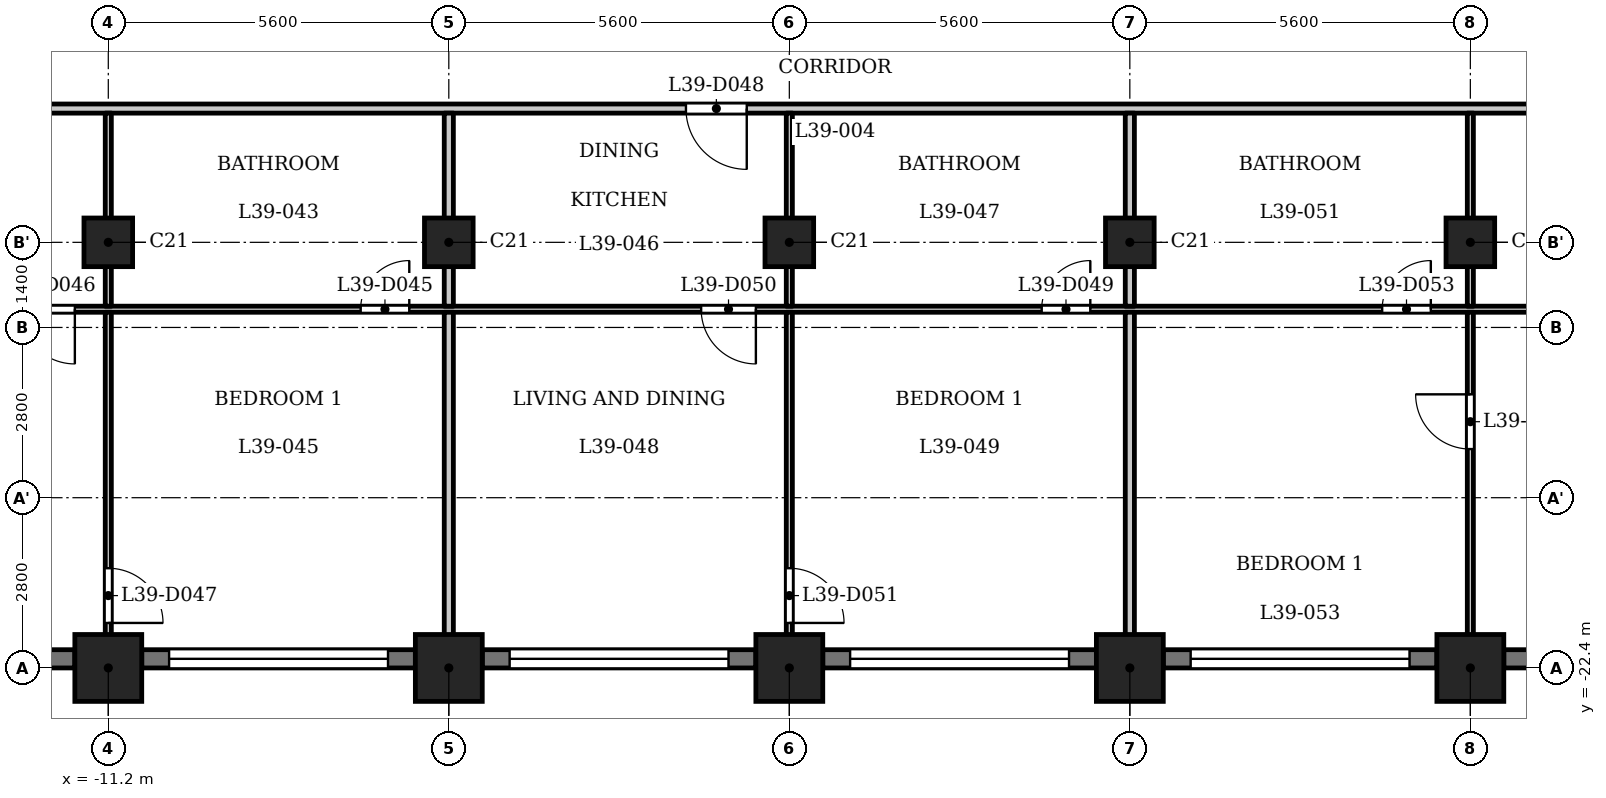
"""IFC4 building model, lengths in metres.
Left out: names, types, materials, properties, quantities, classifications, styles, units other than length and angle.
Written with IfcOpenShell. Run it as: python <this file> out.ifc"""

import sys

from ifc_helpers import new_model, si_unit, direction, frame, frame_2d, origin, origin_2d, place, context, subcontext, project, spatial, rectangle, extrude, element, fill, save


model = new_model("IFC4")
c1 = context("Model", 3, precision=1e-05, world=origin(), true_north=direction((0.0, 1.0)))
c2 = subcontext(c1, "Body", "Model", "MODEL_VIEW")
j1 = project(units=[si_unit("LENGTHUNIT", "METRE"), si_unit("PLANEANGLEUNIT", "RADIAN")], contexts=[c1])
p1 = place(None, origin())
s1 = spatial("IfcSite", under=j1, at=p1, CompositionType="ELEMENT")
p2 = place(p1, origin())
s2 = spatial("IfcBuilding", under=s1, at=p2, CompositionType="ELEMENT")
p3 = place(p2, frame((0.0, 0.0, 153.6)))
s3 = spatial("IfcBuildingStorey", under=s2, at=p3, CompositionType="ELEMENT", Elevation=153.6)
for number, where, z_axis, x_axis in (
    (1, (-11.2, -22.4, 0.0), (0.0, 0.0, 1.0), (1.0, 0.0, 0.0)),
    (2, (-5.6, -22.4, 0.0), (0.0, 0.0, 1.0), (1.0, 0.0, 0.0)),
    (3, (0.0, -22.4, 0.0), (0.0, 0.0, 1.0), (1.0, 0.0, 0.0)),
    (4, (5.6, -22.4, 0.0), (0.0, 0.0, 1.0), (1.0, 0.0, 0.0)),
    (5, (11.2, -22.4, 0.0), (0.0, 0.0, 1.0), (1.0, 0.0, 0.0)),
):
    element("IfcColumn", number, at=place(p3, frame(where, z_axis=z_axis, x_axis=x_axis)), inside=s3, PredefinedType="COLUMN", context=c2, shape_type="SweptSolid", body=[
        extrude(rectangle(XDim=1.1, YDim=1.1, at=origin_2d()), origin(), (0.0, 0.0, 1.0), 3.5),
    ])
for number, where, z_axis, x_axis in (
    (6, (-11.2, -15.4, 0.0), (0.0, 0.0, 1.0), (1.0, 0.0, 0.0)),
    (7, (-5.6, -15.4, 0.0), (0.0, 0.0, 1.0), (1.0, 0.0, 0.0)),
    (8, (0.0, -15.4, 0.0), (0.0, 0.0, 1.0), (1.0, 0.0, 0.0)),
    (9, (5.6, -15.4, 0.0), (0.0, 0.0, 1.0), (1.0, 0.0, 0.0)),
    (10, (11.2, -15.4, 0.0), (0.0, 0.0, 1.0), (1.0, 0.0, 0.0)),
):
    element("IfcColumn", number, at=place(p3, frame(where, z_axis=z_axis, x_axis=x_axis)), inside=s3, PredefinedType="COLUMN", context=c2, shape_type="SweptSolid", body=[
        extrude(rectangle(XDim=0.8, YDim=0.8, at=origin_2d()), origin(), (0.0, 0.0, 1.0), 3.5),
    ])
p4 = place(p3, frame((-16.25, -22.25, 0.0), z_axis=(0.0, 0.0, 1.0), x_axis=(1.0, 0.0, 0.0)))
e11 = element("IfcWall", 11, at=p4, inside=s3, PredefinedType="SOLIDWALL", context=c2, shape_type="SweptSolid", body=[
    extrude(rectangle(XDim=4.5, YDim=0.3, at=frame_2d((2.25, 0.0))), origin(), (0.0, 0.0, 1.0), 2.45),
])
p5 = place(p4, frame((0.45, 0.0, 1.2)))
e12 = element("IfcOpeningElement", 12, at=p5, cuts=e11, PredefinedType="OPENING", context=c2, shape_type="SweptSolid", body=[
    extrude(rectangle(XDim=3.6, YDim=0.95, at=frame_2d((1.8, 0.475))), frame((0.0, 0.16, 0.0), z_axis=(0.0, -1.0, 0.0), x_axis=(1.0, 0.0, 0.0)), (0.0, 0.0, 1.0), 0.32),
])
p6 = place(p3, frame((-10.65, -22.25, 0.0), z_axis=(0.0, 0.0, 1.0), x_axis=(1.0, 0.0, 0.0)))
e13 = element("IfcWall", 13, at=p6, inside=s3, PredefinedType="SOLIDWALL", context=c2, shape_type="SweptSolid", body=[
    extrude(rectangle(XDim=4.5, YDim=0.3, at=frame_2d((2.25, 0.0))), origin(), (0.0, 0.0, 1.0), 2.45),
])
p7 = place(p6, frame((0.45, 0.0, 1.2)))
e14 = element("IfcOpeningElement", 14, at=p7, cuts=e13, PredefinedType="OPENING", context=c2, shape_type="SweptSolid", body=[
    extrude(rectangle(XDim=3.6, YDim=0.95, at=frame_2d((1.8, 0.475))), frame((0.0, 0.16, 0.0), z_axis=(0.0, -1.0, 0.0), x_axis=(1.0, 0.0, 0.0)), (0.0, 0.0, 1.0), 0.32),
])
p8 = place(p3, frame((-5.05, -22.25, 0.0), z_axis=(0.0, 0.0, 1.0), x_axis=(1.0, 0.0, 0.0)))
e15 = element("IfcWall", 15, at=p8, inside=s3, PredefinedType="SOLIDWALL", context=c2, shape_type="SweptSolid", body=[
    extrude(rectangle(XDim=4.5, YDim=0.3, at=frame_2d((2.25, 0.0))), origin(), (0.0, 0.0, 1.0), 2.45),
])
p9 = place(p8, frame((0.45, 0.0, 1.2)))
e16 = element("IfcOpeningElement", 16, at=p9, cuts=e15, PredefinedType="OPENING", context=c2, shape_type="SweptSolid", body=[
    extrude(rectangle(XDim=3.6, YDim=0.95, at=frame_2d((1.8, 0.475))), frame((0.0, 0.16, 0.0), z_axis=(0.0, -1.0, 0.0), x_axis=(1.0, 0.0, 0.0)), (0.0, 0.0, 1.0), 0.32),
])
p10 = place(p3, frame((0.55, -22.25, 0.0), z_axis=(0.0, 0.0, 1.0), x_axis=(1.0, 0.0, 0.0)))
e17 = element("IfcWall", 17, at=p10, inside=s3, PredefinedType="SOLIDWALL", context=c2, shape_type="SweptSolid", body=[
    extrude(rectangle(XDim=4.5, YDim=0.3, at=frame_2d((2.25, 0.0))), origin(), (0.0, 0.0, 1.0), 2.45),
])
p11 = place(p10, frame((0.45, 0.0, 1.2)))
e18 = element("IfcOpeningElement", 18, at=p11, cuts=e17, PredefinedType="OPENING", context=c2, shape_type="SweptSolid", body=[
    extrude(rectangle(XDim=3.6, YDim=0.95, at=frame_2d((1.8, 0.475))), frame((0.0, 0.16, 0.0), z_axis=(0.0, -1.0, 0.0), x_axis=(1.0, 0.0, 0.0)), (0.0, 0.0, 1.0), 0.32),
])
p12 = place(p3, frame((6.15, -22.25, 0.0), z_axis=(0.0, 0.0, 1.0), x_axis=(1.0, 0.0, 0.0)))
e19 = element("IfcWall", 19, at=p12, inside=s3, PredefinedType="SOLIDWALL", context=c2, shape_type="SweptSolid", body=[
    extrude(rectangle(XDim=4.5, YDim=0.3, at=frame_2d((2.25, 0.0))), origin(), (0.0, 0.0, 1.0), 2.45),
])
p13 = place(p12, frame((0.45, 0.0, 1.2)))
e20 = element("IfcOpeningElement", 20, at=p13, cuts=e19, PredefinedType="OPENING", context=c2, shape_type="SweptSolid", body=[
    extrude(rectangle(XDim=3.6, YDim=0.95, at=frame_2d((1.8, 0.475))), frame((0.0, 0.16, 0.0), z_axis=(0.0, -1.0, 0.0), x_axis=(1.0, 0.0, 0.0)), (0.0, 0.0, 1.0), 0.32),
])
p14 = place(p3, frame((11.75, -22.25, 0.0), z_axis=(0.0, 0.0, 1.0), x_axis=(1.0, 0.0, 0.0)))
e21 = element("IfcWall", 21, at=p14, inside=s3, PredefinedType="SOLIDWALL", context=c2, shape_type="SweptSolid", body=[
    extrude(rectangle(XDim=4.5, YDim=0.3, at=frame_2d((2.25, 0.0))), origin(), (0.0, 0.0, 1.0), 2.45),
])
p15 = place(p14, frame((0.45, 0.0, 1.2)))
e22 = element("IfcOpeningElement", 22, at=p15, cuts=e21, PredefinedType="OPENING", context=c2, shape_type="SweptSolid", body=[
    extrude(rectangle(XDim=3.6, YDim=0.95, at=frame_2d((1.8, 0.475))), frame((0.0, 0.16, 0.0), z_axis=(0.0, -1.0, 0.0), x_axis=(1.0, 0.0, 0.0)), (0.0, 0.0, 1.0), 0.32),
])
p16 = place(p3, frame((-16.725, -16.5, 0.0), z_axis=(0.0, 0.0, 1.0), x_axis=(1.0, 0.0, 0.0)))
e23 = element("IfcWall", 23, at=p16, inside=s3, PredefinedType="PARTITIONING", context=c2, shape_type="SweptSolid", body=[
    extrude(rectangle(XDim=33.45, YDim=0.1, at=frame_2d((16.725, 0.0))), origin(), (0.0, 0.0, 1.0), 3.2),
])
p17 = place(p16, frame((9.675, 0.0, 0.0)))
e24 = element("IfcOpeningElement", 24, at=p17, cuts=e23, PredefinedType="OPENING", context=c2, shape_type="SweptSolid", body=[
    extrude(rectangle(XDim=0.8, YDim=2.1, at=frame_2d((0.4, 1.05))), frame((0.0, 0.06, 0.0), z_axis=(0.0, -1.0, 0.0), x_axis=(1.0, 0.0, 0.0)), (0.0, 0.0, 1.0), 0.12),
])
p18 = place(p16, frame((4.075, 0.0, 0.0)))
e25 = element("IfcOpeningElement", 25, at=p18, cuts=e23, PredefinedType="OPENING", context=c2, shape_type="SweptSolid", body=[
    extrude(rectangle(XDim=0.9, YDim=2.1, at=frame_2d((0.45, 1.05))), frame((0.0, 0.06, 0.0), z_axis=(0.0, -1.0, 0.0), x_axis=(1.0, 0.0, 0.0)), (0.0, 0.0, 1.0), 0.12),
])
p19 = place(p16, frame((20.875, 0.0, 0.0)))
e26 = element("IfcOpeningElement", 26, at=p19, cuts=e23, PredefinedType="OPENING", context=c2, shape_type="SweptSolid", body=[
    extrude(rectangle(XDim=0.8, YDim=2.1, at=frame_2d((0.4, 1.05))), frame((0.0, 0.06, 0.0), z_axis=(0.0, -1.0, 0.0), x_axis=(1.0, 0.0, 0.0)), (0.0, 0.0, 1.0), 0.12),
])
p20 = place(p16, frame((15.275, 0.0, 0.0)))
e27 = element("IfcOpeningElement", 27, at=p20, cuts=e23, PredefinedType="OPENING", context=c2, shape_type="SweptSolid", body=[
    extrude(rectangle(XDim=0.9, YDim=2.1, at=frame_2d((0.45, 1.05))), frame((0.0, 0.06, 0.0), z_axis=(0.0, -1.0, 0.0), x_axis=(1.0, 0.0, 0.0)), (0.0, 0.0, 1.0), 0.12),
])
p21 = place(p16, frame((26.475, 0.0, 0.0)))
e28 = element("IfcOpeningElement", 28, at=p21, cuts=e23, PredefinedType="OPENING", context=c2, shape_type="SweptSolid", body=[
    extrude(rectangle(XDim=0.8, YDim=2.1, at=frame_2d((0.4, 1.05))), frame((0.0, 0.06, 0.0), z_axis=(0.0, -1.0, 0.0), x_axis=(1.0, 0.0, 0.0)), (0.0, 0.0, 1.0), 0.12),
])
p22 = place(p16, frame((30.575, 0.0, 0.0)))
e29 = element("IfcOpeningElement", 29, at=p22, cuts=e23, PredefinedType="OPENING", context=c2, shape_type="SweptSolid", body=[
    extrude(rectangle(XDim=0.9, YDim=2.1, at=frame_2d((0.45, 1.05))), frame((0.0, 0.06, 0.0), z_axis=(0.0, -1.0, 0.0), x_axis=(1.0, 0.0, 0.0)), (0.0, 0.0, 1.0), 0.12),
])
p23 = place(p3, frame((-17.4, -13.2, 0.0), z_axis=(0.0, 0.0, 1.0), x_axis=(1.0, 0.0, 0.0)))
e30 = element("IfcWall", 30, at=p23, inside=s3, PredefinedType="PARTITIONING", context=c2, shape_type="SweptSolid", body=[
    extrude(rectangle(XDim=34.8, YDim=0.15, at=frame_2d((17.4, 0.0))), origin(), (0.0, 0.0, 1.0), 3.2),
])
p24 = place(p23, frame((0.15, 0.0, 0.0)))
e31 = element("IfcOpeningElement", 31, at=p24, cuts=e30, PredefinedType="OPENING", context=c2, shape_type="SweptSolid", body=[
    extrude(rectangle(XDim=1.0, YDim=2.1, at=frame_2d((0.5, 1.05))), frame((0.0, 0.085, 0.0), z_axis=(0.0, -1.0, 0.0), x_axis=(1.0, 0.0, 0.0)), (0.0, 0.0, 1.0), 0.17),
])
p25 = place(p23, frame((33.55, 0.0, 0.0)))
e32 = element("IfcOpeningElement", 32, at=p25, cuts=e30, PredefinedType="OPENING", context=c2, shape_type="SweptSolid", body=[
    extrude(rectangle(XDim=1.0, YDim=2.1, at=frame_2d((0.5, 1.05))), frame((0.0, 0.085, 0.0), z_axis=(0.0, -1.0, 0.0), x_axis=(1.0, 0.0, 0.0)), (0.0, 0.0, 1.0), 0.17),
])
p26 = place(p23, frame((15.7, 0.0, 0.0)))
e33 = element("IfcOpeningElement", 33, at=p26, cuts=e30, PredefinedType="OPENING", context=c2, shape_type="SweptSolid", body=[
    extrude(rectangle(XDim=1.0, YDim=2.1, at=frame_2d((0.5, 1.05))), frame((0.0, 0.085, 0.0), z_axis=(0.0, -1.0, 0.0), x_axis=(1.0, 0.0, 0.0)), (0.0, 0.0, 1.0), 0.17),
])
p27 = place(p3, frame((-11.2, -22.93, 0.0), z_axis=(0.0, 0.0, 1.0), x_axis=(0.0, 1.0, 0.0)))
e34 = element("IfcWall", 34, at=p27, inside=s3, PredefinedType="PARTITIONING", context=c2, shape_type="SweptSolid", body=[
    extrude(rectangle(XDim=6.38, YDim=0.1, at=frame_2d((3.19, 0.0))), origin(), (0.0, 0.0, 1.0), 3.2),
])
p28 = place(p27, frame((1.27, 0.0, 0.0)))
e35 = element("IfcOpeningElement", 35, at=p28, cuts=e34, PredefinedType="OPENING", context=c2, shape_type="SweptSolid", body=[
    extrude(rectangle(XDim=0.9, YDim=2.1, at=frame_2d((0.45, 1.05))), frame((0.0, 0.06, 0.0), z_axis=(0.0, -1.0, 0.0), x_axis=(1.0, 0.0, 0.0)), (0.0, 0.0, 1.0), 0.12),
])
p29 = place(p3, frame((-11.2, -16.45, 0.0), z_axis=(0.0, 0.0, 1.0), x_axis=(0.0, 1.0, 0.0)))
e36 = element("IfcWall", 36, at=p29, inside=s3, PredefinedType="PARTITIONING", context=c2, shape_type="SweptSolid", body=[
    extrude(rectangle(XDim=3.175, YDim=0.1, at=frame_2d((1.587, 0.0))), origin(), (0.0, 0.0, 1.0), 3.2),
])
p30 = place(p3, frame((-5.6, -22.93, 0.0), z_axis=(0.0, 0.0, 1.0), x_axis=(0.0, 1.0, 0.0)))
e37 = element("IfcWall", 37, at=p30, inside=s3, PredefinedType="PARTITIONING", context=c2, shape_type="SweptSolid", body=[
    extrude(rectangle(XDim=6.38, YDim=0.15, at=frame_2d((3.19, 0.0))), origin(), (0.0, 0.0, 1.0), 3.2),
])
p31 = place(p3, frame((-5.6, -16.45, 0.0), z_axis=(0.0, 0.0, 1.0), x_axis=(0.0, 1.0, 0.0)))
e38 = element("IfcWall", 38, at=p31, inside=s3, PredefinedType="PARTITIONING", context=c2, shape_type="SweptSolid", body=[
    extrude(rectangle(XDim=3.175, YDim=0.15, at=frame_2d((1.587, 0.0))), origin(), (0.0, 0.0, 1.0), 3.2),
])
p32 = place(p3, frame((0.0, -22.93, 0.0), z_axis=(0.0, 0.0, 1.0), x_axis=(0.0, 1.0, 0.0)))
e39 = element("IfcWall", 39, at=p32, inside=s3, PredefinedType="PARTITIONING", context=c2, shape_type="SweptSolid", body=[
    extrude(rectangle(XDim=6.38, YDim=0.1, at=frame_2d((3.19, 0.0))), origin(), (0.0, 0.0, 1.0), 3.2),
])
p33 = place(p32, frame((1.27, 0.0, 0.0)))
e40 = element("IfcOpeningElement", 40, at=p33, cuts=e39, PredefinedType="OPENING", context=c2, shape_type="SweptSolid", body=[
    extrude(rectangle(XDim=0.9, YDim=2.1, at=frame_2d((0.45, 1.05))), frame((0.0, 0.06, 0.0), z_axis=(0.0, -1.0, 0.0), x_axis=(1.0, 0.0, 0.0)), (0.0, 0.0, 1.0), 0.12),
])
p34 = place(p3, frame((0.0, -16.45, 0.0), z_axis=(0.0, 0.0, 1.0), x_axis=(0.0, 1.0, 0.0)))
e41 = element("IfcWall", 41, at=p34, inside=s3, PredefinedType="PARTITIONING", context=c2, shape_type="SweptSolid", body=[
    extrude(rectangle(XDim=3.175, YDim=0.1, at=frame_2d((1.587, 0.0))), origin(), (0.0, 0.0, 1.0), 3.2),
])
p35 = place(p3, frame((5.6, -22.93, 0.0), z_axis=(0.0, 0.0, 1.0), x_axis=(0.0, 1.0, 0.0)))
e42 = element("IfcWall", 42, at=p35, inside=s3, PredefinedType="PARTITIONING", context=c2, shape_type="SweptSolid", body=[
    extrude(rectangle(XDim=6.38, YDim=0.15, at=frame_2d((3.19, 0.0))), origin(), (0.0, 0.0, 1.0), 3.2),
])
p36 = place(p3, frame((5.6, -16.45, 0.0), z_axis=(0.0, 0.0, 1.0), x_axis=(0.0, 1.0, 0.0)))
e43 = element("IfcWall", 43, at=p36, inside=s3, PredefinedType="PARTITIONING", context=c2, shape_type="SweptSolid", body=[
    extrude(rectangle(XDim=3.175, YDim=0.15, at=frame_2d((1.587, 0.0))), origin(), (0.0, 0.0, 1.0), 3.2),
])
p37 = place(p3, frame((11.2, -22.93, 0.0), z_axis=(0.0, 0.0, 1.0), x_axis=(0.0, 1.0, 0.0)))
e44 = element("IfcWall", 44, at=p37, inside=s3, PredefinedType="PARTITIONING", context=c2, shape_type="SweptSolid", body=[
    extrude(rectangle(XDim=6.38, YDim=0.1, at=frame_2d((3.19, 0.0))), origin(), (0.0, 0.0, 1.0), 3.2),
])
p38 = place(p37, frame((4.13, 0.0, 0.0)))
e45 = element("IfcOpeningElement", 45, at=p38, cuts=e44, PredefinedType="OPENING", context=c2, shape_type="SweptSolid", body=[
    extrude(rectangle(XDim=0.9, YDim=2.1, at=frame_2d((0.45, 1.05))), frame((0.0, 0.06, 0.0), z_axis=(0.0, -1.0, 0.0), x_axis=(1.0, 0.0, 0.0)), (0.0, 0.0, 1.0), 0.12),
])
p39 = place(p3, frame((11.2, -16.45, 0.0), z_axis=(0.0, 0.0, 1.0), x_axis=(0.0, 1.0, 0.0)))
e46 = element("IfcWall", 46, at=p39, inside=s3, PredefinedType="PARTITIONING", context=c2, shape_type="SweptSolid", body=[
    extrude(rectangle(XDim=3.175, YDim=0.1, at=frame_2d((1.587, 0.0))), origin(), (0.0, 0.0, 1.0), 3.2),
])
p40 = place(p17, origin())
e47 = element("IfcDoor", 47, at=p40, inside=s3, OperationType="SINGLE_SWING_LEFT", PredefinedType="DOOR", context=c2, shape_type="SweptSolid", body=[
    extrude(rectangle(XDim=0.8, YDim=2.1, at=frame_2d((0.4, 1.05))), frame((0.0, 0.025, 0.0), z_axis=(0.0, -1.0, 0.0), x_axis=(1.0, 0.0, 0.0)), (0.0, 0.0, 1.0), 0.05),
])
fill(e24, e47)
p41 = place(p18, origin())
e48 = element("IfcDoor", 48, at=p41, inside=s3, OperationType="SINGLE_SWING_RIGHT", PredefinedType="DOOR", context=c2, shape_type="SweptSolid", body=[
    extrude(rectangle(XDim=0.9, YDim=2.1, at=frame_2d((0.45, 1.05))), frame((0.0, 0.025, 0.0), z_axis=(0.0, -1.0, 0.0), x_axis=(1.0, 0.0, 0.0)), (0.0, 0.0, 1.0), 0.05),
])
fill(e25, e48)
p42 = place(p28, origin())
e49 = element("IfcDoor", 49, at=p42, inside=s3, OperationType="SINGLE_SWING_LEFT", PredefinedType="DOOR", context=c2, shape_type="SweptSolid", body=[
    extrude(rectangle(XDim=0.9, YDim=2.1, at=frame_2d((0.45, 1.05))), frame((0.0, 0.025, 0.0), z_axis=(0.0, -1.0, 0.0), x_axis=(1.0, 0.0, 0.0)), (0.0, 0.0, 1.0), 0.05),
])
fill(e35, e49)
p43 = place(p26, origin())
e50 = element("IfcDoor", 50, at=p43, inside=s3, OperationType="SINGLE_SWING_RIGHT", PredefinedType="DOOR", context=c2, shape_type="SweptSolid", body=[
    extrude(rectangle(XDim=1.0, YDim=2.1, at=frame_2d((0.5, 1.05))), frame((0.0, 0.025, 0.0), z_axis=(0.0, -1.0, 0.0), x_axis=(1.0, 0.0, 0.0)), (0.0, 0.0, 1.0), 0.05),
])
fill(e33, e50)
p44 = place(p19, origin())
e51 = element("IfcDoor", 51, at=p44, inside=s3, OperationType="SINGLE_SWING_LEFT", PredefinedType="DOOR", context=c2, shape_type="SweptSolid", body=[
    extrude(rectangle(XDim=0.8, YDim=2.1, at=frame_2d((0.4, 1.05))), frame((0.0, 0.025, 0.0), z_axis=(0.0, -1.0, 0.0), x_axis=(1.0, 0.0, 0.0)), (0.0, 0.0, 1.0), 0.05),
])
fill(e26, e51)
p45 = place(p20, origin())
e52 = element("IfcDoor", 52, at=p45, inside=s3, OperationType="SINGLE_SWING_RIGHT", PredefinedType="DOOR", context=c2, shape_type="SweptSolid", body=[
    extrude(rectangle(XDim=0.9, YDim=2.1, at=frame_2d((0.45, 1.05))), frame((0.0, 0.025, 0.0), z_axis=(0.0, -1.0, 0.0), x_axis=(1.0, 0.0, 0.0)), (0.0, 0.0, 1.0), 0.05),
])
fill(e27, e52)
p46 = place(p33, origin())
e53 = element("IfcDoor", 53, at=p46, inside=s3, OperationType="SINGLE_SWING_LEFT", PredefinedType="DOOR", context=c2, shape_type="SweptSolid", body=[
    extrude(rectangle(XDim=0.9, YDim=2.1, at=frame_2d((0.45, 1.05))), frame((0.0, 0.025, 0.0), z_axis=(0.0, -1.0, 0.0), x_axis=(1.0, 0.0, 0.0)), (0.0, 0.0, 1.0), 0.05),
])
fill(e40, e53)
p47 = place(p21, origin())
e54 = element("IfcDoor", 54, at=p47, inside=s3, OperationType="SINGLE_SWING_LEFT", PredefinedType="DOOR", context=c2, shape_type="SweptSolid", body=[
    extrude(rectangle(XDim=0.8, YDim=2.1, at=frame_2d((0.4, 1.05))), frame((0.0, 0.025, 0.0), z_axis=(0.0, -1.0, 0.0), x_axis=(1.0, 0.0, 0.0)), (0.0, 0.0, 1.0), 0.05),
])
fill(e28, e54)
p48 = place(p38, origin())
e55 = element("IfcDoor", 55, at=p48, inside=s3, OperationType="SINGLE_SWING_LEFT", PredefinedType="DOOR", context=c2, shape_type="SweptSolid", body=[
    extrude(rectangle(XDim=0.9, YDim=2.1, at=frame_2d((0.45, 1.05))), frame((0.0, 0.025, 0.0), z_axis=(0.0, -1.0, 0.0), x_axis=(1.0, 0.0, 0.0)), (0.0, 0.0, 1.0), 0.05),
])
fill(e45, e55)
p49 = place(p7, origin())
e56 = element("IfcWindow", 56, at=p49, inside=s3, PartitioningType="SINGLE_PANEL", PredefinedType="WINDOW", context=c2, shape_type="SweptSolid", body=[
    extrude(rectangle(XDim=3.6, YDim=0.95, at=frame_2d((1.8, 0.475))), frame((0.0, 0.03, 0.0), z_axis=(0.0, -1.0, 0.0), x_axis=(1.0, 0.0, 0.0)), (0.0, 0.0, 1.0), 0.06),
])
fill(e14, e56)
p50 = place(p9, origin())
e57 = element("IfcWindow", 57, at=p50, inside=s3, PartitioningType="SINGLE_PANEL", PredefinedType="WINDOW", context=c2, shape_type="SweptSolid", body=[
    extrude(rectangle(XDim=3.6, YDim=0.95, at=frame_2d((1.8, 0.475))), frame((0.0, 0.03, 0.0), z_axis=(0.0, -1.0, 0.0), x_axis=(1.0, 0.0, 0.0)), (0.0, 0.0, 1.0), 0.06),
])
fill(e16, e57)
p51 = place(p11, origin())
e58 = element("IfcWindow", 58, at=p51, inside=s3, PartitioningType="SINGLE_PANEL", PredefinedType="WINDOW", context=c2, shape_type="SweptSolid", body=[
    extrude(rectangle(XDim=3.6, YDim=0.95, at=frame_2d((1.8, 0.475))), frame((0.0, 0.03, 0.0), z_axis=(0.0, -1.0, 0.0), x_axis=(1.0, 0.0, 0.0)), (0.0, 0.0, 1.0), 0.06),
])
fill(e18, e58)
p52 = place(p13, origin())
e59 = element("IfcWindow", 59, at=p52, inside=s3, PartitioningType="SINGLE_PANEL", PredefinedType="WINDOW", context=c2, shape_type="SweptSolid", body=[
    extrude(rectangle(XDim=3.6, YDim=0.95, at=frame_2d((1.8, 0.475))), frame((0.0, 0.03, 0.0), z_axis=(0.0, -1.0, 0.0), x_axis=(1.0, 0.0, 0.0)), (0.0, 0.0, 1.0), 0.06),
])
fill(e20, e59)
save(model, sys.argv[1])
